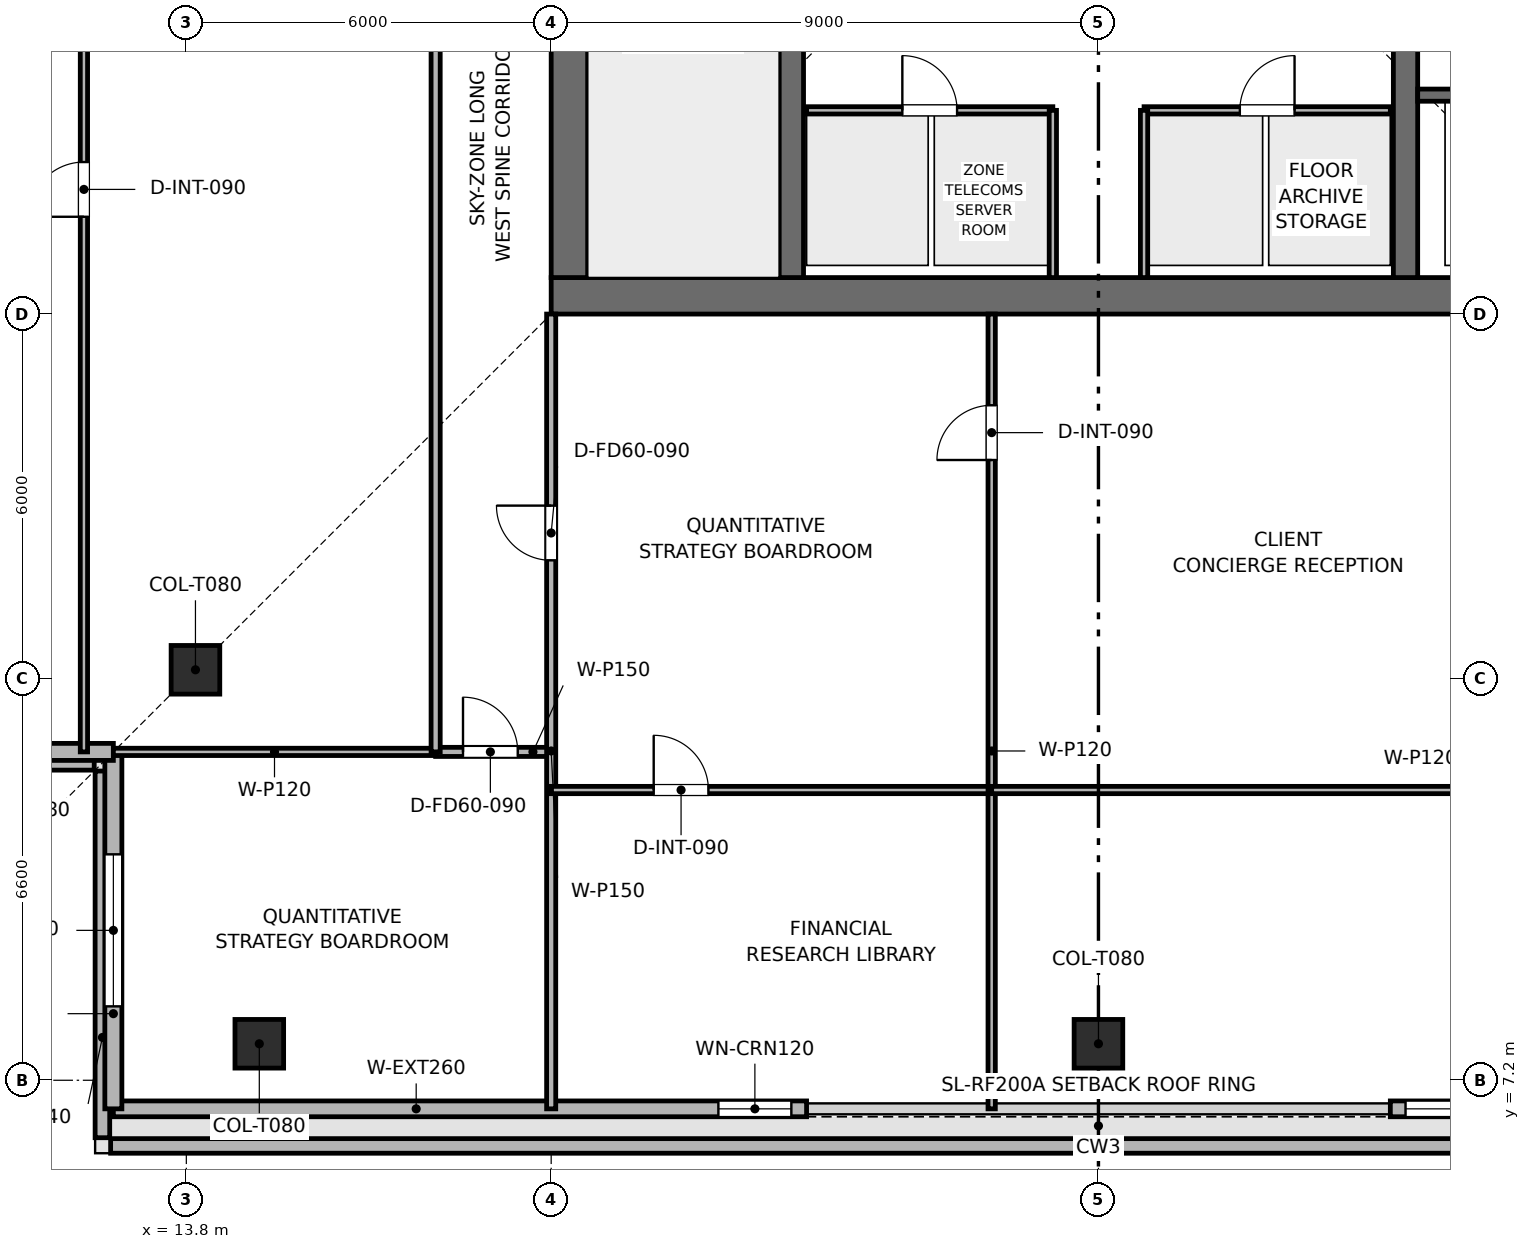
"""IFC4 building model, lengths in metres.
Left out: names, types, materials, properties, quantities, classifications, styles, units other than length and angle.
Written with IfcOpenShell. Run it as: python <this file> out.ifc"""

import sys

from ifc_helpers import new_model, si_unit, direction, frame, frame_2d, origin, origin_2d, place, context, subcontext, project, spatial, rectangle, extrude, element, fill, save


model = new_model("IFC4")
c1 = context("Model", 3, precision=1e-05, world=origin(), true_north=direction((0.0, 1.0)))
c2 = subcontext(c1, "Body", "Model", "MODEL_VIEW")
j1 = project(units=[si_unit("LENGTHUNIT", "METRE"), si_unit("PLANEANGLEUNIT", "RADIAN")], contexts=[c1])
p1 = place(None, origin())
s1 = spatial("IfcSite", under=j1, at=p1, CompositionType="ELEMENT")
p2 = place(p1, origin())
s2 = spatial("IfcBuilding", under=s1, at=p2, CompositionType="ELEMENT")
p3 = place(p2, frame((0.0, 0.0, 333.0)))
s3 = spatial("IfcBuildingStorey", under=s2, at=p3, CompositionType="ELEMENT", Elevation=333.0)
p4 = place(p3, frame((19.8, 20.1, 0.0), z_axis=(0.0, 0.0, 1.0), x_axis=(1.0, 0.0, 0.0)))
e1 = element("IfcWall", 1, at=p4, inside=s3, PredefinedType="SHEAR", context=c2, shape_type="SweptSolid", body=[
    extrude(rectangle(XDim=18.0, YDim=0.6, at=frame_2d((9.0, 0.0))), origin(), (0.0, 0.0, 1.0), 3.75),
])
p5 = place(p3, frame((20.1, 20.4, 0.0), z_axis=(0.0, 0.0, 1.0), x_axis=(0.0, 1.0, 0.0)))
e2 = element("IfcWall", 2, at=p5, inside=s3, PredefinedType="SHEAR", context=c2, shape_type="SweptSolid", body=[
    extrude(rectangle(XDim=16.8, YDim=0.6, at=frame_2d((8.4, 0.0))), origin(), (0.0, 0.0, 1.0), 3.75),
])
p6 = place(p5, frame((10.4, 0.0, 0.0)))
e3 = element("IfcOpeningElement", 3, at=p6, cuts=e2, PredefinedType="OPENING", context=c2, shape_type="SweptSolid", body=[
    extrude(rectangle(XDim=1.1, YDim=2.15, at=frame_2d((0.55, 1.075))), frame((0.0, 0.31, 0.0), z_axis=(0.0, -1.0, 0.0), x_axis=(1.0, 0.0, 0.0)), (0.0, 0.0, 1.0), 0.62),
])
for number, where, z_axis, x_axis in (
    (4, (23.75, 20.4, 0.0), (0.0, 0.0, 1.0), (0.0, 1.0, 0.0)),
    (5, (33.85, 20.4, 0.0), (0.0, 0.0, 1.0), (0.0, 1.0, 0.0)),
):
    element("IfcWall", number, at=place(p3, frame(where, z_axis=z_axis, x_axis=x_axis)), inside=s3, PredefinedType="SHEAR", context=c2, shape_type="SweptSolid", body=[
        extrude(rectangle(XDim=16.8, YDim=0.4, at=frame_2d((8.4, 0.0))), origin(), (0.0, 0.0, 1.0), 3.75),
    ])
for number, where, z_axis, x_axis in (
    (6, (15.0, 7.8, 0.003), (0.0, 0.0, 1.0), (1.0, 0.0, 0.0)),
    (7, (28.8, 7.8, 0.003), (0.0, 0.0, 1.0), (1.0, 0.0, 0.0)),
    (8, (13.95, 13.95, 0.003), (0.0, 0.0, 1.0), (1.0, 0.0, 0.0)),
):
    element("IfcColumn", number, at=place(p3, frame(where, z_axis=z_axis, x_axis=x_axis)), inside=s3, PredefinedType="COLUMN", context=c2, shape_type="SweptSolid", body=[
        extrude(rectangle(XDim=0.8, YDim=0.8, at=origin_2d()), origin(), (0.0, 0.0, 1.0), 3.504),
    ])
p7 = place(p3, frame((12.555, 6.12, 0.0), z_axis=(0.0, 0.0, 1.0), x_axis=(1.0, 0.0, 0.0)))
e9 = element("IfcWall", 9, at=p7, inside=s3, PredefinedType="PARAPET", context=c2, shape_type="SweptSolid", body=[
    extrude(rectangle(XDim=32.49, YDim=0.24, at=frame_2d((16.245, 0.0))), origin(), (0.0, 0.0, 1.0), 1.2),
])
for number, where, z_axis, x_axis in (
    (10, (6.255, 12.42, 0.0), (0.0, 0.0, 1.0), (1.0, 0.0, 0.0)),
    (11, (12.42, 12.285, 0.0), (0.0, 0.0, 1.0), (0.0, -1.0, 0.0)),
):
    element("IfcWall", number, at=place(p3, frame(where, z_axis=z_axis, x_axis=x_axis)), inside=s3, PredefinedType="PARAPET", context=c2, shape_type="SweptSolid", body=[
        extrude(rectangle(XDim=6.03, YDim=0.24, at=frame_2d((3.015, 0.0))), origin(), (0.0, 0.0, 1.0), 1.2),
    ])
p8 = place(p3, frame((45.0, 6.73, 0.0), z_axis=(0.0, 0.0, 1.0), x_axis=(-1.0, 0.0, 0.0)))
e12 = element("IfcWall", 12, at=p8, inside=s3, PredefinedType="SOLIDWALL", context=c2, shape_type="SweptSolid", body=[
    extrude(rectangle(XDim=11.4, YDim=0.26, at=frame_2d((5.7, 0.0))), origin(), (0.0, 0.0, 1.0), 3.51),
])
p9 = place(p8, frame((7.35, 0.0, 0.9)))
e13 = element("IfcOpeningElement", 13, at=p9, cuts=e12, PredefinedType="OPENING", context=c2, shape_type="SweptSolid", body=[
    extrude(rectangle(XDim=3.8, YDim=1.9, at=frame_2d((1.9, 0.95))), frame((0.0, 0.14, 0.0), z_axis=(0.0, -1.0, 0.0), x_axis=(1.0, 0.0, 0.0)), (0.0, 0.0, 1.0), 0.28),
])
p10 = place(p3, frame((24.0, 6.73, 0.0), z_axis=(0.0, 0.0, 1.0), x_axis=(-1.0, 0.0, 0.0)))
e14 = element("IfcWall", 14, at=p10, inside=s3, PredefinedType="SOLIDWALL", context=c2, shape_type="SweptSolid", body=[
    extrude(rectangle(XDim=11.4, YDim=0.26, at=frame_2d((5.7, 0.0))), origin(), (0.0, 0.0, 1.0), 3.51),
])
p11 = place(p10, frame((0.25, 0.0, 0.9)))
e15 = element("IfcOpeningElement", 15, at=p11, cuts=e14, PredefinedType="OPENING", context=c2, shape_type="SweptSolid", body=[
    extrude(rectangle(XDim=1.2, YDim=2.1, at=frame_2d((0.6, 1.05))), frame((0.0, 0.14, 0.0), z_axis=(0.0, -1.0, 0.0), x_axis=(1.0, 0.0, 0.0)), (0.0, 0.0, 1.0), 0.28),
])
p12 = place(p3, frame((12.6, 6.73, 0.0), z_axis=(0.0, 0.0, 1.0), x_axis=(0.0, 1.0, 0.0)))
e16 = element("IfcWall", 16, at=p12, inside=s3, PredefinedType="SOLIDWALL", context=c2, shape_type="SweptSolid", body=[
    extrude(rectangle(XDim=5.87, YDim=0.28, at=frame_2d((2.935, 0.0))), origin(), (0.0, 0.0, 1.0), 3.51),
])
p13 = place(p12, frame((1.685, 0.0, 0.9)))
e17 = element("IfcOpeningElement", 17, at=p13, cuts=e16, PredefinedType="OPENING", context=c2, shape_type="SweptSolid", body=[
    extrude(rectangle(XDim=2.5, YDim=1.9, at=frame_2d((1.25, 0.95))), frame((0.0, 0.15, 0.0), z_axis=(0.0, -1.0, 0.0), x_axis=(1.0, 0.0, 0.0)), (0.0, 0.0, 1.0), 0.3),
])
p14 = place(p3, frame((12.6, 12.6, 0.0), z_axis=(0.0, 0.0, 1.0), x_axis=(-1.0, 0.0, 0.0)))
e18 = element("IfcWall", 18, at=p14, inside=s3, PredefinedType="SOLIDWALL", context=c2, shape_type="SweptSolid", body=[
    extrude(rectangle(XDim=5.87, YDim=0.28, at=frame_2d((2.935, 0.0))), origin(), (0.0, 0.0, 1.0), 3.51),
])
p15 = place(p14, frame((1.685, 0.0, 0.9)))
e19 = element("IfcOpeningElement", 19, at=p15, cuts=e18, PredefinedType="OPENING", context=c2, shape_type="SweptSolid", body=[
    extrude(rectangle(XDim=2.5, YDim=1.9, at=frame_2d((1.25, 0.95))), frame((0.0, 0.15, 0.0), z_axis=(0.0, -1.0, 0.0), x_axis=(1.0, 0.0, 0.0)), (0.0, 0.0, 1.0), 0.3),
])
p16 = place(p3, frame((34.05, 23.4, 0.0), z_axis=(0.0, 0.0, 1.0), x_axis=(1.0, 0.0, 0.0)))
e20 = element("IfcWall", 20, at=p16, inside=s3, PredefinedType="SHEAR", context=c2, shape_type="SweptSolid", body=[
    extrude(rectangle(XDim=3.05, YDim=0.2, at=frame_2d((1.525, 0.0))), origin(), (0.0, 0.0, 1.0), 3.51),
])
p17 = place(p16, frame((1.2, 0.0, 0.0)))
e21 = element("IfcOpeningElement", 21, at=p17, cuts=e20, PredefinedType="OPENING", context=c2, shape_type="SweptSolid", body=[
    extrude(rectangle(XDim=1.1, YDim=2.15, at=frame_2d((0.55, 1.075))), frame((0.0, 0.11, 0.0), z_axis=(0.0, -1.0, 0.0), x_axis=(1.0, 0.0, 0.0)), (0.0, 0.0, 1.0), 0.22),
])
p18 = place(p3, frame((24.0, 23.15, 0.0), z_axis=(0.0, 0.0, 1.0), x_axis=(1.0, 0.0, 0.0)))
e22 = element("IfcWall", 22, at=p18, inside=s3, PredefinedType="PARTITIONING", context=c2, shape_type="SweptSolid", body=[
    extrude(rectangle(XDim=4.05, YDim=0.12, at=frame_2d((2.025, 0.0))), origin(), (0.0, 0.0, 1.0), 3.51),
])
p19 = place(p18, frame((1.575, 0.0, 0.0)))
e23 = element("IfcOpeningElement", 23, at=p19, cuts=e22, PredefinedType="OPENING", context=c2, shape_type="SweptSolid", body=[
    extrude(rectangle(XDim=0.9, YDim=2.1, at=frame_2d((0.45, 1.05))), frame((0.0, 0.07, 0.0), z_axis=(0.0, -1.0, 0.0), x_axis=(1.0, 0.0, 0.0)), (0.0, 0.0, 1.0), 0.14),
])
p20 = place(p3, frame((28.05, 20.4, 0.0), z_axis=(0.0, 0.0, 1.0), x_axis=(0.0, 1.0, 0.0)))
e24 = element("IfcWall", 24, at=p20, inside=s3, PredefinedType="PARTITIONING", context=c2, shape_type="SweptSolid", body=[
    extrude(rectangle(XDim=2.75, YDim=0.12, at=frame_2d((1.375, 0.0))), origin(), (0.0, 0.0, 1.0), 3.51),
])
p21 = place(p3, frame((29.55, 23.15, 0.0), z_axis=(0.0, 0.0, 1.0), x_axis=(1.0, 0.0, 0.0)))
e25 = element("IfcWall", 25, at=p21, inside=s3, PredefinedType="PARTITIONING", context=c2, shape_type="SweptSolid", body=[
    extrude(rectangle(XDim=4.05, YDim=0.12, at=frame_2d((2.025, 0.0))), origin(), (0.0, 0.0, 1.0), 3.51),
])
p22 = place(p21, frame((1.575, 0.0, 0.0)))
e26 = element("IfcOpeningElement", 26, at=p22, cuts=e25, PredefinedType="OPENING", context=c2, shape_type="SweptSolid", body=[
    extrude(rectangle(XDim=0.9, YDim=2.1, at=frame_2d((0.45, 1.05))), frame((0.0, 0.07, 0.0), z_axis=(0.0, -1.0, 0.0), x_axis=(1.0, 0.0, 0.0)), (0.0, 0.0, 1.0), 0.14),
])
p23 = place(p3, frame((29.55, 20.4, 0.0), z_axis=(0.0, 0.0, 1.0), x_axis=(0.0, 1.0, 0.0)))
e27 = element("IfcWall", 27, at=p23, inside=s3, PredefinedType="PARTITIONING", context=c2, shape_type="SweptSolid", body=[
    extrude(rectangle(XDim=2.75, YDim=0.12, at=frame_2d((1.375, 0.0))), origin(), (0.0, 0.0, 1.0), 3.51),
])
p24 = place(p3, frame((12.116, 12.6, 0.0), z_axis=(0.0, 0.0, 1.0), x_axis=(0.0, 1.0, 0.0)))
e28 = element("IfcWall", 28, at=p24, inside=s3, PredefinedType="PARTITIONING", context=c2, shape_type="SweptSolid", body=[
    extrude(rectangle(XDim=27.1, YDim=0.12, at=frame_2d((13.55, 0.0))), origin(), (0.0, 0.0, 1.0), 3.095),
])
p25 = place(p24, frame((8.8, 0.0, 0.0)))
e29 = element("IfcOpeningElement", 29, at=p25, cuts=e28, PredefinedType="OPENING", context=c2, shape_type="SweptSolid", body=[
    extrude(rectangle(XDim=0.9, YDim=2.1, at=frame_2d((0.45, 1.05))), frame((0.0, 0.07, 0.0), z_axis=(0.0, -1.0, 0.0), x_axis=(1.0, 0.0, 0.0)), (0.0, 0.0, 1.0), 0.14),
])
p26 = place(p3, frame((12.6, 12.6, 0.0), z_axis=(0.0, 0.0, 1.0), x_axis=(1.0, 0.0, 0.0)))
e30 = element("IfcWall", 30, at=p26, inside=s3, PredefinedType="PARTITIONING", context=c2, shape_type="SweptSolid", body=[
    extrude(rectangle(XDim=5.3, YDim=0.12, at=frame_2d((2.65, 0.0))), origin(), (0.0, 0.0, 1.0), 3.195),
])
p27 = place(p3, frame((17.9, 12.6, 0.0), z_axis=(0.0, 0.0, 1.0), x_axis=(1.0, 0.0, 0.0)))
e31 = element("IfcWall", 31, at=p27, inside=s3, PredefinedType="PARTITIONING", context=c2, shape_type="SweptSolid", body=[
    extrude(rectangle(XDim=1.9, YDim=0.15, at=frame_2d((0.95, 0.0))), origin(), (0.0, 0.0, 1.0), 3.51),
])
p28 = place(p27, frame((0.45, 0.0, 0.0)))
e32 = element("IfcOpeningElement", 32, at=p28, cuts=e31, PredefinedType="OPENING", context=c2, shape_type="SweptSolid", body=[
    extrude(rectangle(XDim=0.9, YDim=2.1, at=frame_2d((0.45, 1.05))), frame((0.0, 0.085, 0.0), z_axis=(0.0, -1.0, 0.0), x_axis=(1.0, 0.0, 0.0)), (0.0, 0.0, 1.0), 0.17),
])
p29 = place(p3, frame((19.8, 6.73, 0.0), z_axis=(0.0, 0.0, 1.0), x_axis=(0.0, 1.0, 0.0)))
e33 = element("IfcWall", 33, at=p29, inside=s3, PredefinedType="PARTITIONING", context=c2, shape_type="SweptSolid", body=[
    extrude(rectangle(XDim=13.07, YDim=0.15, at=frame_2d((6.535, 0.0))), origin(), (0.0, 0.0, 1.0), 3.095),
])
p30 = place(p29, frame((9.02, 0.0, 0.0)))
e34 = element("IfcOpeningElement", 34, at=p30, cuts=e33, PredefinedType="OPENING", context=c2, shape_type="SweptSolid", body=[
    extrude(rectangle(XDim=0.9, YDim=2.1, at=frame_2d((0.45, 1.05))), frame((0.0, 0.085, 0.0), z_axis=(0.0, -1.0, 0.0), x_axis=(1.0, 0.0, 0.0)), (0.0, 0.0, 1.0), 0.17),
])
p31 = place(p3, frame((19.8, 11.973, 0.0), z_axis=(0.0, 0.0, 1.0), x_axis=(1.0, 0.0, 0.0)))
e35 = element("IfcWall", 35, at=p31, inside=s3, PredefinedType="PARTITIONING", context=c2, shape_type="SweptSolid", body=[
    extrude(rectangle(XDim=7.244, YDim=0.12, at=frame_2d((3.622, 0.0))), origin(), (0.0, 0.0, 1.0), 3.095),
])
p32 = place(p31, frame((1.686, 0.0, 0.0)))
e36 = element("IfcOpeningElement", 36, at=p32, cuts=e35, PredefinedType="OPENING", context=c2, shape_type="SweptSolid", body=[
    extrude(rectangle(XDim=0.9, YDim=2.1, at=frame_2d((0.45, 1.05))), frame((0.0, 0.07, 0.0), z_axis=(0.0, -1.0, 0.0), x_axis=(1.0, 0.0, 0.0)), (0.0, 0.0, 1.0), 0.14),
])
p33 = place(p3, frame((27.044, 6.73, 0.0), z_axis=(0.0, 0.0, 1.0), x_axis=(0.0, 1.0, 0.0)))
e37 = element("IfcWall", 37, at=p33, inside=s3, PredefinedType="PARTITIONING", context=c2, shape_type="SweptSolid", body=[
    extrude(rectangle(XDim=13.07, YDim=0.12, at=frame_2d((6.535, 0.0))), origin(), (0.0, 0.0, 1.0), 3.135),
])
p34 = place(p33, frame((10.67, 0.0, 0.0)))
e38 = element("IfcOpeningElement", 38, at=p34, cuts=e37, PredefinedType="OPENING", context=c2, shape_type="SweptSolid", body=[
    extrude(rectangle(XDim=0.9, YDim=2.1, at=frame_2d((0.45, 1.05))), frame((0.0, 0.07, 0.0), z_axis=(0.0, -1.0, 0.0), x_axis=(1.0, 0.0, 0.0)), (0.0, 0.0, 1.0), 0.14),
])
p35 = place(p3, frame((27.044, 11.973, 0.0), z_axis=(0.0, 0.0, 1.0), x_axis=(1.0, 0.0, 0.0)))
e39 = element("IfcWall", 39, at=p35, inside=s3, PredefinedType="PARTITIONING", context=c2, shape_type="SweptSolid", body=[
    extrude(rectangle(XDim=17.956, YDim=0.12, at=frame_2d((8.978, 0.0))), origin(), (0.0, 0.0, 1.0), 3.095),
])
p36 = place(p35, frame((8.528, 0.0, 0.0)))
e40 = element("IfcOpeningElement", 40, at=p36, cuts=e39, PredefinedType="OPENING", context=c2, shape_type="SweptSolid", body=[
    extrude(rectangle(XDim=0.9, YDim=2.1, at=frame_2d((0.45, 1.05))), frame((0.0, 0.07, 0.0), z_axis=(0.0, -1.0, 0.0), x_axis=(1.0, 0.0, 0.0)), (0.0, 0.0, 1.0), 0.14),
])
p37 = place(p3, frame((17.9, 12.6, 0.0), z_axis=(0.0, 0.0, 1.0), x_axis=(0.0, 1.0, 0.0)))
e41 = element("IfcWall", 41, at=p37, inside=s3, PredefinedType="PARTITIONING", context=c2, shape_type="SweptSolid", body=[
    extrude(rectangle(XDim=27.1, YDim=0.15, at=frame_2d((13.55, 0.0))), origin(), (0.0, 0.0, 1.0), 3.095),
])
p38 = place(p37, frame((13.1, 0.0, 0.0)))
e42 = element("IfcOpeningElement", 42, at=p38, cuts=e41, PredefinedType="OPENING", context=c2, shape_type="SweptSolid", body=[
    extrude(rectangle(XDim=0.9, YDim=2.1, at=frame_2d((0.45, 1.05))), frame((0.0, 0.085, 0.0), z_axis=(0.0, -1.0, 0.0), x_axis=(1.0, 0.0, 0.0)), (0.0, 0.0, 1.0), 0.17),
])
p39 = place(p9, origin())
e43 = element("IfcWindow", 43, at=p39, inside=s3, PartitioningType="SINGLE_PANEL", PredefinedType="WINDOW", context=c2, shape_type="SweptSolid", body=[
    extrude(rectangle(XDim=3.8, YDim=1.9, at=frame_2d((1.9, 0.95))), frame((0.0, 0.03, 0.0), z_axis=(0.0, -1.0, 0.0), x_axis=(1.0, 0.0, 0.0)), (0.0, 0.0, 1.0), 0.06),
])
fill(e13, e43)
p40 = place(p11, origin())
e44 = element("IfcWindow", 44, at=p40, inside=s3, PartitioningType="SINGLE_PANEL", PredefinedType="WINDOW", context=c2, shape_type="SweptSolid", body=[
    extrude(rectangle(XDim=1.2, YDim=2.1, at=frame_2d((0.6, 1.05))), frame((0.0, 0.03, 0.0), z_axis=(0.0, -1.0, 0.0), x_axis=(1.0, 0.0, 0.0)), (0.0, 0.0, 1.0), 0.06),
])
fill(e15, e44)
p41 = place(p13, origin())
e45 = element("IfcWindow", 45, at=p41, inside=s3, PartitioningType="SINGLE_PANEL", PredefinedType="WINDOW", context=c2, shape_type="SweptSolid", body=[
    extrude(rectangle(XDim=2.5, YDim=1.9, at=frame_2d((1.25, 0.95))), frame((0.0, 0.03, 0.0), z_axis=(0.0, -1.0, 0.0), x_axis=(1.0, 0.0, 0.0)), (0.0, 0.0, 1.0), 0.06),
])
fill(e17, e45)
p42 = place(p19, origin())
e46 = element("IfcDoor", 46, at=p42, inside=s3, OperationType="SINGLE_SWING_LEFT", PredefinedType="DOOR", context=c2, shape_type="SweptSolid", body=[
    extrude(rectangle(XDim=0.9, YDim=2.1, at=frame_2d((0.45, 1.05))), frame((0.0, 0.025, 0.0), z_axis=(0.0, -1.0, 0.0), x_axis=(1.0, 0.0, 0.0)), (0.0, 0.0, 1.0), 0.05),
])
fill(e23, e46)
p43 = place(p22, origin())
e47 = element("IfcDoor", 47, at=p43, inside=s3, OperationType="SINGLE_SWING_RIGHT", PredefinedType="DOOR", context=c2, shape_type="SweptSolid", body=[
    extrude(rectangle(XDim=0.9, YDim=2.1, at=frame_2d((0.45, 1.05))), frame((0.0, 0.025, 0.0), z_axis=(0.0, -1.0, 0.0), x_axis=(1.0, 0.0, 0.0)), (0.0, 0.0, 1.0), 0.05),
])
fill(e26, e47)
p44 = place(p25, origin())
e48 = element("IfcDoor", 48, at=p44, inside=s3, OperationType="SINGLE_SWING_LEFT", PredefinedType="DOOR", context=c2, shape_type="SweptSolid", body=[
    extrude(rectangle(XDim=0.9, YDim=2.1, at=frame_2d((0.45, 1.05))), frame((0.0, 0.025, 0.0), z_axis=(0.0, -1.0, 0.0), x_axis=(1.0, 0.0, 0.0)), (0.0, 0.0, 1.0), 0.05),
])
fill(e29, e48)
p45 = place(p28, origin())
e49 = element("IfcDoor", 49, at=p45, inside=s3, OperationType="SINGLE_SWING_LEFT", PredefinedType="DOOR", context=c2, shape_type="SweptSolid", body=[
    extrude(rectangle(XDim=0.9, YDim=2.1, at=frame_2d((0.45, 1.05))), frame((0.0, 0.025, 0.0), z_axis=(0.0, -1.0, 0.0), x_axis=(1.0, 0.0, 0.0)), (0.0, 0.0, 1.0), 0.05),
])
fill(e32, e49)
p46 = place(p30, origin())
e50 = element("IfcDoor", 50, at=p46, inside=s3, OperationType="SINGLE_SWING_RIGHT", PredefinedType="DOOR", context=c2, shape_type="SweptSolid", body=[
    extrude(rectangle(XDim=0.9, YDim=2.1, at=frame_2d((0.45, 1.05))), frame((0.0, 0.025, 0.0), z_axis=(0.0, -1.0, 0.0), x_axis=(1.0, 0.0, 0.0)), (0.0, 0.0, 1.0), 0.05),
])
fill(e34, e50)
p47 = place(p32, origin())
e51 = element("IfcDoor", 51, at=p47, inside=s3, OperationType="SINGLE_SWING_LEFT", PredefinedType="DOOR", context=c2, shape_type="SweptSolid", body=[
    extrude(rectangle(XDim=0.9, YDim=2.1, at=frame_2d((0.45, 1.05))), frame((0.0, 0.025, 0.0), z_axis=(0.0, -1.0, 0.0), x_axis=(1.0, 0.0, 0.0)), (0.0, 0.0, 1.0), 0.05),
])
fill(e36, e51)
p48 = place(p34, origin())
e52 = element("IfcDoor", 52, at=p48, inside=s3, OperationType="SINGLE_SWING_LEFT", PredefinedType="DOOR", context=c2, shape_type="SweptSolid", body=[
    extrude(rectangle(XDim=0.9, YDim=2.1, at=frame_2d((0.45, 1.05))), frame((0.0, 0.025, 0.0), z_axis=(0.0, -1.0, 0.0), x_axis=(1.0, 0.0, 0.0)), (0.0, 0.0, 1.0), 0.05),
])
fill(e38, e52)
save(model, sys.argv[1])
